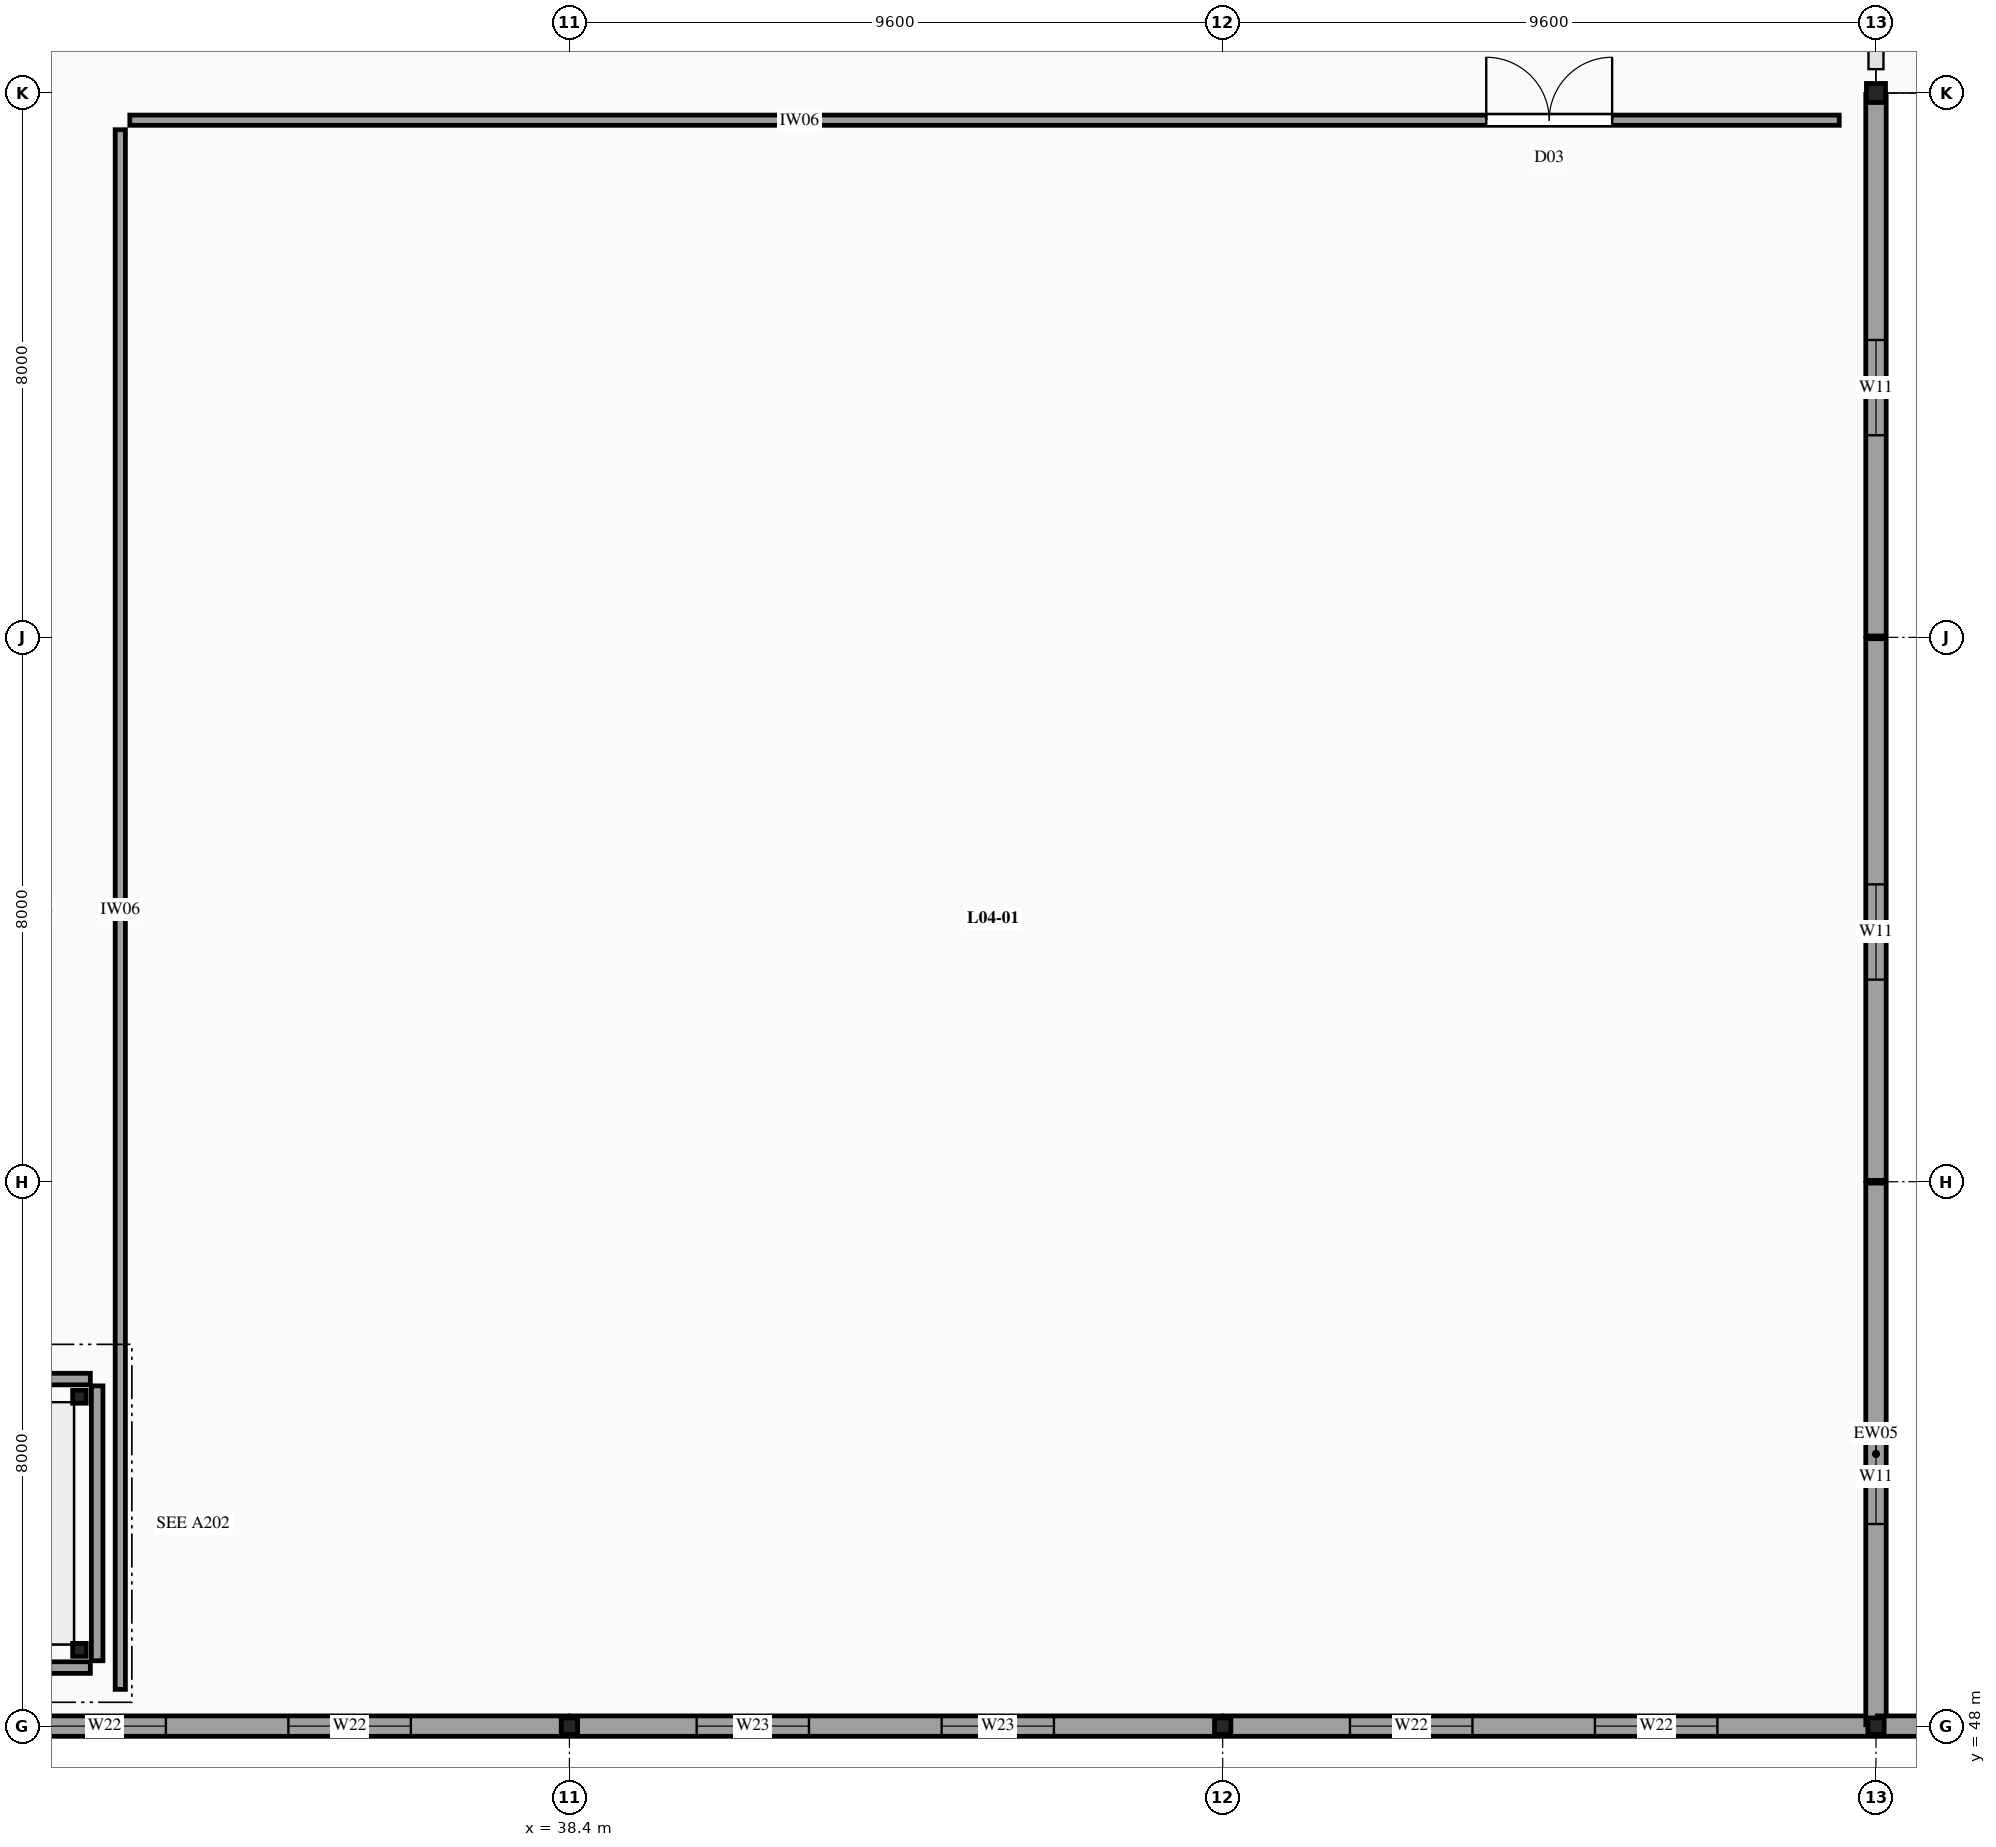
"""IFC4 building model, lengths in metres.
Left out: names, types, materials, properties, quantities, classifications, styles, units other than length and angle.
Written with IfcOpenShell. Run it as: python <this file> out.ifc"""

import sys

from ifc_helpers import new_model, si_unit, direction, frame, frame_2d, origin, origin_2d, place, context, subcontext, project, spatial, rectangle, i_section, extrude, element, fill, save


model = new_model("IFC4")
c1 = context("Model", 3, precision=1e-05, world=origin(), true_north=direction((0.0, 1.0)))
c2 = subcontext(c1, "Body", "Model", "MODEL_VIEW")
j1 = project(units=[si_unit("LENGTHUNIT", "METRE"), si_unit("PLANEANGLEUNIT", "RADIAN")], contexts=[c1])
p1 = place(None, origin())
s1 = spatial("IfcSite", under=j1, at=p1, CompositionType="ELEMENT")
p2 = place(p1, origin())
s2 = spatial("IfcBuilding", under=s1, at=p2, CompositionType="ELEMENT")
p3 = place(p2, frame((0.0, 0.0, 17.4)))
s3 = spatial("IfcBuildingStorey", under=s2, at=p3, CompositionType="ELEMENT", Elevation=17.4)
p4 = place(p3, frame((38.4, 48.0, -0.28), z_axis=(0.0, 0.0, 1.0), x_axis=(1.0, 0.0, 0.0)))
e1 = element("IfcColumn", 1, at=p4, inside=s3, PredefinedType="COLUMN", context=c2, shape_type="SweptSolid", body=[
    extrude(i_section(OverallWidth=0.24, OverallDepth=0.24, WebThickness=0.01, FlangeThickness=0.017, FilletRadius=0.021, at=origin_2d()), origin(), (0.0, 0.0, 1.0), 8.42),
])
p5 = place(p3, frame((48.0, 48.0, -0.28), z_axis=(0.0, 0.0, 1.0), x_axis=(1.0, 0.0, 0.0)))
e2 = element("IfcColumn", 2, at=p5, inside=s3, PredefinedType="COLUMN", context=c2, shape_type="SweptSolid", body=[
    extrude(i_section(OverallWidth=0.24, OverallDepth=0.24, WebThickness=0.01, FlangeThickness=0.017, FilletRadius=0.021, at=origin_2d()), origin(), (0.0, 0.0, 1.0), 8.955),
])
p6 = place(p3, frame((57.6, 48.0, -0.28), z_axis=(0.0, 0.0, 1.0), x_axis=(1.0, 0.0, 0.0)))
e3 = element("IfcColumn", 3, at=p6, inside=s3, PredefinedType="COLUMN", context=c2, shape_type="SweptSolid", body=[
    extrude(i_section(OverallWidth=0.24, OverallDepth=0.24, WebThickness=0.01, FlangeThickness=0.017, FilletRadius=0.021, at=origin_2d()), origin(), (0.0, 0.0, 1.0), 7.917),
])
p7 = place(p3, frame((57.6, 72.0, -0.28), z_axis=(0.0, 0.0, 1.0), x_axis=(1.0, 0.0, 0.0)))
e4 = element("IfcColumn", 4, at=p7, inside=s3, PredefinedType="COLUMN", context=c2, shape_type="SweptSolid", body=[
    extrude(i_section(OverallWidth=0.28, OverallDepth=0.28, WebThickness=0.01, FlangeThickness=0.018, FilletRadius=0.024, at=origin_2d()), origin(), (0.0, 0.0, 1.0), 8.43),
])
for number, where, z_axis, x_axis in (
    (5, (31.2, 49.12, 0.0), (0.0, 0.0, 1.0), (1.0, 0.0, 0.0)),
    (6, (31.2, 52.84, 0.0), (0.0, 0.0, 1.0), (1.0, 0.0, 0.0)),
):
    element("IfcColumn", number, at=place(p3, frame(where, z_axis=z_axis, x_axis=x_axis)), inside=s3, PredefinedType="COLUMN", context=c2, shape_type="SweptSolid", body=[
        extrude(i_section(OverallWidth=0.2, OverallDepth=0.19, WebThickness=0.007, FlangeThickness=0.01, FilletRadius=0.018, at=origin_2d()), origin(), (0.0, 0.0, 1.0), 8.4),
    ])
p8 = place(p3, frame((28.82, 48.0, 0.0), z_axis=(0.0, 0.0, 1.0), x_axis=(1.0, 0.0, 0.0)))
e7 = element("IfcWall", 7, at=p8, inside=s3, PredefinedType="SOLIDWALL", context=c2, shape_type="SweptSolid", body=[
    extrude(rectangle(XDim=9.56, YDim=0.3, at=frame_2d((4.78, 0.0))), origin(), (0.0, 0.0, 1.0), 7.46),
])
p9 = place(p8, frame((1.85, 0.0, 0.85)))
e8 = element("IfcOpeningElement", 8, at=p9, cuts=e7, PredefinedType="OPENING", context=c2, shape_type="SweptSolid", body=[
    extrude(rectangle(XDim=1.8, YDim=3.6, at=frame_2d((0.9, 1.8))), frame((0.0, 0.16, 0.0), z_axis=(0.0, -1.0, 0.0), x_axis=(1.0, 0.0, 0.0)), (0.0, 0.0, 1.0), 0.32),
])
p10 = place(p8, frame((5.45, 0.0, 0.85)))
e9 = element("IfcOpeningElement", 9, at=p10, cuts=e7, PredefinedType="OPENING", context=c2, shape_type="SweptSolid", body=[
    extrude(rectangle(XDim=1.8, YDim=3.6, at=frame_2d((0.9, 1.8))), frame((0.0, 0.16, 0.0), z_axis=(0.0, -1.0, 0.0), x_axis=(1.0, 0.0, 0.0)), (0.0, 0.0, 1.0), 0.32),
])
p11 = place(p3, frame((38.42, 48.0, 0.0), z_axis=(0.0, 0.0, 1.0), x_axis=(1.0, 0.0, 0.0)))
e10 = element("IfcWall", 10, at=p11, inside=s3, PredefinedType="SOLIDWALL", context=c2, shape_type="SweptSolid", body=[
    extrude(rectangle(XDim=9.56, YDim=0.3, at=frame_2d((4.78, 0.0))), origin(), (0.0, 0.0, 1.0), 7.46),
])
p12 = place(p11, frame((1.85, 0.0, 0.85)))
e11 = element("IfcOpeningElement", 11, at=p12, cuts=e10, PredefinedType="OPENING", context=c2, shape_type="SweptSolid", body=[
    extrude(rectangle(XDim=1.65, YDim=3.4, at=frame_2d((0.825, 1.7))), frame((0.0, 0.16, 0.0), z_axis=(0.0, -1.0, 0.0), x_axis=(1.0, 0.0, 0.0)), (0.0, 0.0, 1.0), 0.32),
])
p13 = place(p11, frame((5.45, 0.0, 0.85)))
e12 = element("IfcOpeningElement", 12, at=p13, cuts=e10, PredefinedType="OPENING", context=c2, shape_type="SweptSolid", body=[
    extrude(rectangle(XDim=1.65, YDim=3.4, at=frame_2d((0.825, 1.7))), frame((0.0, 0.16, 0.0), z_axis=(0.0, -1.0, 0.0), x_axis=(1.0, 0.0, 0.0)), (0.0, 0.0, 1.0), 0.32),
])
p14 = place(p3, frame((48.02, 48.0, 0.0), z_axis=(0.0, 0.0, 1.0), x_axis=(1.0, 0.0, 0.0)))
e13 = element("IfcWall", 13, at=p14, inside=s3, PredefinedType="SOLIDWALL", context=c2, shape_type="SweptSolid", body=[
    extrude(rectangle(XDim=9.56, YDim=0.3, at=frame_2d((4.78, 0.0))), origin(), (0.0, 0.0, 1.0), 7.25),
])
p15 = place(p14, frame((1.85, 0.0, 0.85)))
e14 = element("IfcOpeningElement", 14, at=p15, cuts=e13, PredefinedType="OPENING", context=c2, shape_type="SweptSolid", body=[
    extrude(rectangle(XDim=1.8, YDim=3.6, at=frame_2d((0.9, 1.8))), frame((0.0, 0.16, 0.0), z_axis=(0.0, -1.0, 0.0), x_axis=(1.0, 0.0, 0.0)), (0.0, 0.0, 1.0), 0.32),
])
p16 = place(p14, frame((5.45, 0.0, 0.85)))
e15 = element("IfcOpeningElement", 15, at=p16, cuts=e13, PredefinedType="OPENING", context=c2, shape_type="SweptSolid", body=[
    extrude(rectangle(XDim=1.8, YDim=3.6, at=frame_2d((0.9, 1.8))), frame((0.0, 0.16, 0.0), z_axis=(0.0, -1.0, 0.0), x_axis=(1.0, 0.0, 0.0)), (0.0, 0.0, 1.0), 0.32),
])
p17 = place(p3, frame((57.6, 48.02, 0.0), z_axis=(0.0, 0.0, 1.0), x_axis=(0.0, 1.0, 0.0)))
e16 = element("IfcWall", 16, at=p17, inside=s3, PredefinedType="SOLIDWALL", context=c2, shape_type="SweptSolid", body=[
    extrude(rectangle(XDim=7.96, YDim=0.3, at=frame_2d((3.98, 0.0))), origin(), (0.0, 0.0, 1.0), 5.25),
])
p18 = place(p17, frame((2.95, 0.0, 0.85)))
e17 = element("IfcOpeningElement", 17, at=p18, cuts=e16, PredefinedType="OPENING", context=c2, shape_type="SweptSolid", body=[
    extrude(rectangle(XDim=1.4, YDim=1.8, at=frame_2d((0.7, 0.9))), frame((0.0, 0.16, 0.0), z_axis=(0.0, -1.0, 0.0), x_axis=(1.0, 0.0, 0.0)), (0.0, 0.0, 1.0), 0.32),
])
p19 = place(p3, frame((57.6, 56.02, 0.0), z_axis=(0.0, 0.0, 1.0), x_axis=(0.0, 1.0, 0.0)))
e18 = element("IfcWall", 18, at=p19, inside=s3, PredefinedType="SOLIDWALL", context=c2, shape_type="SweptSolid", body=[
    extrude(rectangle(XDim=7.96, YDim=0.3, at=frame_2d((3.98, 0.0))), origin(), (0.0, 0.0, 1.0), 5.25),
])
p20 = place(p19, frame((2.95, 0.0, 0.85)))
e19 = element("IfcOpeningElement", 19, at=p20, cuts=e18, PredefinedType="OPENING", context=c2, shape_type="SweptSolid", body=[
    extrude(rectangle(XDim=1.4, YDim=1.8, at=frame_2d((0.7, 0.9))), frame((0.0, 0.16, 0.0), z_axis=(0.0, -1.0, 0.0), x_axis=(1.0, 0.0, 0.0)), (0.0, 0.0, 1.0), 0.32),
])
p21 = place(p3, frame((57.6, 64.02, 0.0), z_axis=(0.0, 0.0, 1.0), x_axis=(0.0, 1.0, 0.0)))
e20 = element("IfcWall", 20, at=p21, inside=s3, PredefinedType="SOLIDWALL", context=c2, shape_type="SweptSolid", body=[
    extrude(rectangle(XDim=7.96, YDim=0.3, at=frame_2d((3.98, 0.0))), origin(), (0.0, 0.0, 1.0), 5.25),
])
p22 = place(p21, frame((2.95, 0.0, 0.85)))
e21 = element("IfcOpeningElement", 21, at=p22, cuts=e20, PredefinedType="OPENING", context=c2, shape_type="SweptSolid", body=[
    extrude(rectangle(XDim=1.4, YDim=1.8, at=frame_2d((0.7, 0.9))), frame((0.0, 0.16, 0.0), z_axis=(0.0, -1.0, 0.0), x_axis=(1.0, 0.0, 0.0)), (0.0, 0.0, 1.0), 0.32),
])
p23 = place(p3, frame((57.62, 48.0, -0.28), z_axis=(0.0, 0.0, 1.0), x_axis=(1.0, 0.0, 0.0)))
e22 = element("IfcWall", 22, at=p23, inside=s3, PredefinedType="SOLIDWALL", context=c2, shape_type="SweptSolid", body=[
    extrude(rectangle(XDim=9.56, YDim=0.3, at=frame_2d((4.78, 0.0))), origin(), (0.0, 0.0, 1.0), 6.798),
])
p24 = place(p3, frame((31.46, 48.96, 0.0), z_axis=(0.0, 0.0, 1.0), x_axis=(0.0, 1.0, 0.0)))
e23 = element("IfcWall", 23, at=p24, inside=s3, PredefinedType="SOLIDWALL", context=c2, shape_type="SweptSolid", body=[
    extrude(rectangle(XDim=4.04, YDim=0.17, at=frame_2d((2.02, 0.0))), origin(), (0.0, 0.0, 1.0), 7.5),
])
for number, where, z_axis, x_axis in (
    (24, (21.36, 48.86, 0.0), (0.0, 0.0, 1.0), (1.0, 0.0, 0.0)),
    (25, (21.36, 53.1, 0.0), (0.0, 0.0, 1.0), (1.0, 0.0, 0.0)),
):
    element("IfcWall", number, at=place(p3, frame(where, z_axis=z_axis, x_axis=x_axis)), inside=s3, PredefinedType="SOLIDWALL", context=c2, shape_type="SweptSolid", body=[
        extrude(rectangle(XDim=10.0, YDim=0.17, at=frame_2d((5.0, 0.0))), origin(), (0.0, 0.0, 1.0), 7.5),
    ])
p25 = place(p3, frame((31.94, 71.6, 0.0), z_axis=(0.0, 0.0, 1.0), x_axis=(1.0, 0.0, 0.0)))
e26 = element("IfcWall", 26, at=p25, inside=s3, PredefinedType="PARTITIONING", context=c2, shape_type="SweptSolid", body=[
    extrude(rectangle(XDim=25.12, YDim=0.15, at=frame_2d((12.56, 0.0))), origin(), (0.0, 0.0, 1.0), 7.5),
])
p26 = place(p25, frame((19.933, 0.0, 0.0)))
e27 = element("IfcOpeningElement", 27, at=p26, cuts=e26, PredefinedType="OPENING", context=c2, shape_type="SweptSolid", body=[
    extrude(rectangle(XDim=1.85, YDim=2.5, at=frame_2d((0.925, 1.25))), frame((0.0, 0.085, 0.0), z_axis=(0.0, -1.0, 0.0), x_axis=(1.0, 0.0, 0.0)), (0.0, 0.0, 1.0), 0.17),
])
p27 = place(p3, frame((31.8, 48.54, 0.0), z_axis=(0.0, 0.0, 1.0), x_axis=(0.0, 1.0, 0.0)))
e28 = element("IfcWall", 28, at=p27, inside=s3, PredefinedType="PARTITIONING", context=c2, shape_type="SweptSolid", body=[
    extrude(rectangle(XDim=22.92, YDim=0.15, at=frame_2d((11.46, 0.0))), origin(), (0.0, 0.0, 1.0), 7.5),
])
p28 = place(p9, origin())
e29 = element("IfcWindow", 29, at=p28, inside=s3, PartitioningType="SINGLE_PANEL", PredefinedType="WINDOW", context=c2, shape_type="SweptSolid", body=[
    extrude(rectangle(XDim=1.8, YDim=3.6, at=frame_2d((0.9, 1.8))), frame((0.0, 0.03, 0.0), z_axis=(0.0, -1.0, 0.0), x_axis=(1.0, 0.0, 0.0)), (0.0, 0.0, 1.0), 0.06),
])
fill(e8, e29)
p29 = place(p10, origin())
e30 = element("IfcWindow", 30, at=p29, inside=s3, PartitioningType="SINGLE_PANEL", PredefinedType="WINDOW", context=c2, shape_type="SweptSolid", body=[
    extrude(rectangle(XDim=1.8, YDim=3.6, at=frame_2d((0.9, 1.8))), frame((0.0, 0.03, 0.0), z_axis=(0.0, -1.0, 0.0), x_axis=(1.0, 0.0, 0.0)), (0.0, 0.0, 1.0), 0.06),
])
fill(e9, e30)
p30 = place(p12, origin())
e31 = element("IfcWindow", 31, at=p30, inside=s3, PartitioningType="SINGLE_PANEL", PredefinedType="WINDOW", context=c2, shape_type="SweptSolid", body=[
    extrude(rectangle(XDim=1.65, YDim=3.4, at=frame_2d((0.825, 1.7))), frame((0.0, 0.03, 0.0), z_axis=(0.0, -1.0, 0.0), x_axis=(1.0, 0.0, 0.0)), (0.0, 0.0, 1.0), 0.06),
])
fill(e11, e31)
p31 = place(p13, origin())
e32 = element("IfcWindow", 32, at=p31, inside=s3, PartitioningType="SINGLE_PANEL", PredefinedType="WINDOW", context=c2, shape_type="SweptSolid", body=[
    extrude(rectangle(XDim=1.65, YDim=3.4, at=frame_2d((0.825, 1.7))), frame((0.0, 0.03, 0.0), z_axis=(0.0, -1.0, 0.0), x_axis=(1.0, 0.0, 0.0)), (0.0, 0.0, 1.0), 0.06),
])
fill(e12, e32)
p32 = place(p15, origin())
e33 = element("IfcWindow", 33, at=p32, inside=s3, PartitioningType="SINGLE_PANEL", PredefinedType="WINDOW", context=c2, shape_type="SweptSolid", body=[
    extrude(rectangle(XDim=1.8, YDim=3.6, at=frame_2d((0.9, 1.8))), frame((0.0, 0.03, 0.0), z_axis=(0.0, -1.0, 0.0), x_axis=(1.0, 0.0, 0.0)), (0.0, 0.0, 1.0), 0.06),
])
fill(e14, e33)
p33 = place(p16, origin())
e34 = element("IfcWindow", 34, at=p33, inside=s3, PartitioningType="SINGLE_PANEL", PredefinedType="WINDOW", context=c2, shape_type="SweptSolid", body=[
    extrude(rectangle(XDim=1.8, YDim=3.6, at=frame_2d((0.9, 1.8))), frame((0.0, 0.03, 0.0), z_axis=(0.0, -1.0, 0.0), x_axis=(1.0, 0.0, 0.0)), (0.0, 0.0, 1.0), 0.06),
])
fill(e15, e34)
p34 = place(p18, origin())
e35 = element("IfcWindow", 35, at=p34, inside=s3, PartitioningType="SINGLE_PANEL", PredefinedType="WINDOW", context=c2, shape_type="SweptSolid", body=[
    extrude(rectangle(XDim=1.4, YDim=1.8, at=frame_2d((0.7, 0.9))), frame((0.0, 0.03, 0.0), z_axis=(0.0, -1.0, 0.0), x_axis=(1.0, 0.0, 0.0)), (0.0, 0.0, 1.0), 0.06),
])
fill(e17, e35)
p35 = place(p20, origin())
e36 = element("IfcWindow", 36, at=p35, inside=s3, PartitioningType="SINGLE_PANEL", PredefinedType="WINDOW", context=c2, shape_type="SweptSolid", body=[
    extrude(rectangle(XDim=1.4, YDim=1.8, at=frame_2d((0.7, 0.9))), frame((0.0, 0.03, 0.0), z_axis=(0.0, -1.0, 0.0), x_axis=(1.0, 0.0, 0.0)), (0.0, 0.0, 1.0), 0.06),
])
fill(e19, e36)
p36 = place(p22, origin())
e37 = element("IfcWindow", 37, at=p36, inside=s3, PartitioningType="SINGLE_PANEL", PredefinedType="WINDOW", context=c2, shape_type="SweptSolid", body=[
    extrude(rectangle(XDim=1.4, YDim=1.8, at=frame_2d((0.7, 0.9))), frame((0.0, 0.03, 0.0), z_axis=(0.0, -1.0, 0.0), x_axis=(1.0, 0.0, 0.0)), (0.0, 0.0, 1.0), 0.06),
])
fill(e21, e37)
p37 = place(p26, origin())
e38 = element("IfcDoor", 38, at=p37, inside=s3, OperationType="DOUBLE_DOOR_SINGLE_SWING", PredefinedType="DOOR", context=c2, shape_type="SweptSolid", body=[
    extrude(rectangle(XDim=1.85, YDim=2.5, at=frame_2d((0.925, 1.25))), frame((0.0, 0.025, 0.0), z_axis=(0.0, -1.0, 0.0), x_axis=(1.0, 0.0, 0.0)), (0.0, 0.0, 1.0), 0.05),
])
fill(e27, e38)
save(model, sys.argv[1])
